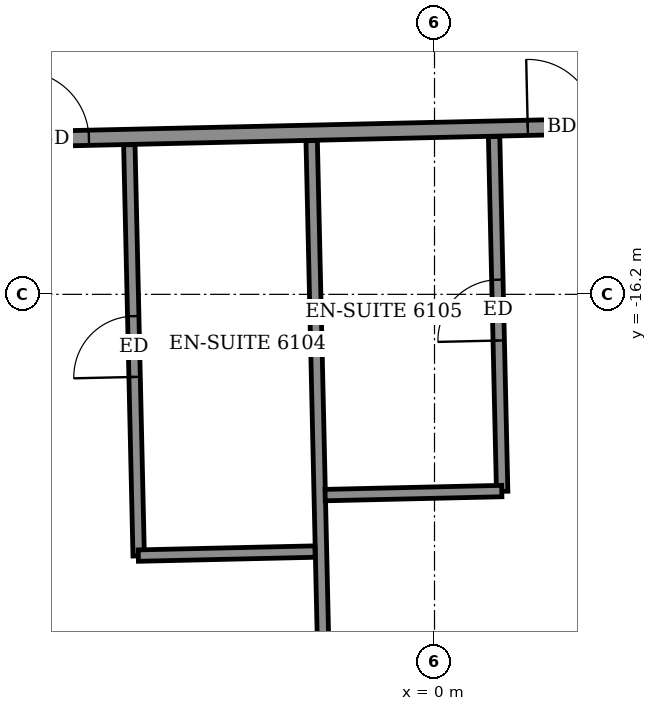
"""IFC4 building model, lengths in metres.
Left out: names, types, materials, properties, quantities, classifications, styles, units other than length and angle.
Written with IfcOpenShell. Run it as: python <this file> out.ifc"""

import sys

from ifc_helpers import new_model, si_unit, direction, frame, frame_2d, origin, place, context, subcontext, project, spatial, rectangle, extrude, element, fill, save


model = new_model("IFC4")
c1 = context("Model", 3, precision=1e-05, world=origin(), true_north=direction((0.0, 1.0)))
c2 = subcontext(c1, "Body", "Model", "MODEL_VIEW")
j1 = project(units=[si_unit("LENGTHUNIT", "METRE"), si_unit("PLANEANGLEUNIT", "RADIAN")], contexts=[c1])
p1 = place(None, origin())
s1 = spatial("IfcSite", under=j1, at=p1, CompositionType="ELEMENT")
p2 = place(p1, origin())
s2 = spatial("IfcBuilding", under=s1, at=p2, CompositionType="ELEMENT")
p3 = place(p2, frame((0.0, 0.0, 241.9)))
s3 = spatial("IfcBuildingStorey", under=s2, at=p3, CompositionType="ELEMENT", Elevation=241.9)
p4 = place(p3, frame((-1.358, -25.551, 0.0), z_axis=(0.0, 0.0, 1.0), x_axis=(-0.022684355347, 0.999742676904, 0.0)))
e1 = element("IfcWall", 1, at=p4, inside=s3, PredefinedType="PARTITIONING", context=c2, shape_type="SweptSolid", body=[
    extrude(rectangle(XDim=11.376, YDim=0.15, at=frame_2d((5.688, 0.0))), origin(), (0.0, 0.0, 1.0), 3.05),
])
p5 = place(p3, frame((-3.892, -19.641, 0.0), z_axis=(0.0, 0.0, 1.0), x_axis=(-0.022696805576, 0.999742394328, 0.0)))
e2 = element("IfcWall", 2, at=p5, inside=s3, PredefinedType="PARTITIONING", context=c2, shape_type="SweptSolid", body=[
    extrude(rectangle(XDim=5.411, YDim=0.15, at=frame_2d((2.705, 0.0))), origin(), (0.0, 0.0, 1.0), 3.05),
])
p6 = place(p5, frame((2.355, 0.0, 0.0)))
e3 = element("IfcOpeningElement", 3, at=p6, cuts=e2, PredefinedType="OPENING", context=c2, shape_type="SweptSolid", body=[
    extrude(rectangle(XDim=0.8, YDim=2.1, at=frame_2d((0.4, 1.05))), frame((0.0, 0.085, 0.0), z_axis=(0.0, -1.0, 0.0), x_axis=(1.0, 0.0, 0.0)), (0.0, 0.0, 1.0), 0.17),
])
p7 = place(p3, frame((-3.897, -19.637, 0.0), z_axis=(0.0, 0.0, 1.0), x_axis=(0.999740478815, 0.022781023197, 0.0)))
e4 = element("IfcWall", 4, at=p7, inside=s3, PredefinedType="PARTITIONING", context=c2, shape_type="SweptSolid", body=[
    extrude(rectangle(XDim=2.325, YDim=0.15, at=frame_2d((1.163, 0.0))), origin(), (0.0, 0.0, 1.0), 3.05),
])
p8 = place(p3, frame((0.89, -18.792, 0.0), z_axis=(0.0, 0.0, 1.0), x_axis=(-0.022688155425, 0.999742590672, 0.0)))
e5 = element("IfcWall", 5, at=p8, inside=s3, PredefinedType="PARTITIONING", context=c2, shape_type="SweptSolid", body=[
    extrude(rectangle(XDim=4.67, YDim=0.15, at=frame_2d((2.335, 0.0))), origin(), (0.0, 0.0, 1.0), 3.05),
])
p9 = place(p8, frame((1.985, 0.0, 0.0)))
e6 = element("IfcOpeningElement", 6, at=p9, cuts=e5, PredefinedType="OPENING", context=c2, shape_type="SweptSolid", body=[
    extrude(rectangle(XDim=0.8, YDim=2.1, at=frame_2d((0.4, 1.05))), frame((0.0, 0.085, 0.0), z_axis=(0.0, -1.0, 0.0), x_axis=(1.0, 0.0, 0.0)), (0.0, 0.0, 1.0), 0.17),
])
p10 = place(p3, frame((-1.439, -18.841, 0.0), z_axis=(0.0, 0.0, 1.0), x_axis=(0.999740260747, 0.02279059109, 0.0)))
e7 = element("IfcWall", 7, at=p10, inside=s3, PredefinedType="PARTITIONING", context=c2, shape_type="SweptSolid", body=[
    extrude(rectangle(XDim=2.324, YDim=0.15, at=frame_2d((1.162, 0.0))), origin(), (0.0, 0.0, 1.0), 3.05),
])
p11 = place(p3, frame((-27.016, -14.65, 0.0), z_axis=(0.0, 0.0, 1.0), x_axis=(0.999742874861, 0.022675629315, 0.0)))
e8 = element("IfcWall", 8, at=p11, inside=s3, PredefinedType="PARTITIONING", context=c2, shape_type="SweptSolid", body=[
    extrude(rectangle(XDim=50.883, YDim=0.2, at=frame_2d((25.442, 0.0))), origin(), (0.0, 0.0, 1.0), 3.05),
])
p12 = place(p11, frame((1.575, 0.0, 0.0)))
e9 = element("IfcOpeningElement", 9, at=p12, cuts=e8, PredefinedType="OPENING", context=c2, shape_type="SweptSolid", body=[
    extrude(rectangle(XDim=1.0, YDim=2.1, at=frame_2d((0.5, 1.05))), frame((0.0, 0.11, 0.0), z_axis=(0.0, -1.0, 0.0), x_axis=(1.0, 0.0, 0.0)), (0.0, 0.0, 1.0), 0.22),
])
p13 = place(p11, frame((6.4, 0.0, 0.0)))
e10 = element("IfcOpeningElement", 10, at=p13, cuts=e8, PredefinedType="OPENING", context=c2, shape_type="SweptSolid", body=[
    extrude(rectangle(XDim=0.9, YDim=2.1, at=frame_2d((0.45, 1.05))), frame((0.0, 0.11, 0.0), z_axis=(0.0, -1.0, 0.0), x_axis=(1.0, 0.0, 0.0)), (0.0, 0.0, 1.0), 0.22),
])
p14 = place(p11, frame((11.025, 0.0, 0.0)))
e11 = element("IfcOpeningElement", 11, at=p14, cuts=e8, PredefinedType="OPENING", context=c2, shape_type="SweptSolid", body=[
    extrude(rectangle(XDim=0.9, YDim=2.1, at=frame_2d((0.45, 1.05))), frame((0.0, 0.11, 0.0), z_axis=(0.0, -1.0, 0.0), x_axis=(1.0, 0.0, 0.0)), (0.0, 0.0, 1.0), 0.22),
])
p15 = place(p11, frame((12.925, 0.0, 0.0)))
e12 = element("IfcOpeningElement", 12, at=p15, cuts=e8, PredefinedType="OPENING", context=c2, shape_type="SweptSolid", body=[
    extrude(rectangle(XDim=0.9, YDim=2.1, at=frame_2d((0.45, 1.05))), frame((0.0, 0.11, 0.0), z_axis=(0.0, -1.0, 0.0), x_axis=(1.0, 0.0, 0.0)), (0.0, 0.0, 1.0), 0.22),
])
p16 = place(p11, frame((19.65, 0.0, 0.0)))
e13 = element("IfcOpeningElement", 13, at=p16, cuts=e8, PredefinedType="OPENING", context=c2, shape_type="SweptSolid", body=[
    extrude(rectangle(XDim=0.9, YDim=2.1, at=frame_2d((0.45, 1.05))), frame((0.0, 0.11, 0.0), z_axis=(0.0, -1.0, 0.0), x_axis=(1.0, 0.0, 0.0)), (0.0, 0.0, 1.0), 0.22),
])
p17 = place(p11, frame((21.575, 0.0, 0.0)))
e14 = element("IfcOpeningElement", 14, at=p17, cuts=e8, PredefinedType="OPENING", context=c2, shape_type="SweptSolid", body=[
    extrude(rectangle(XDim=0.9, YDim=2.1, at=frame_2d((0.45, 1.05))), frame((0.0, 0.11, 0.0), z_axis=(0.0, -1.0, 0.0), x_axis=(1.0, 0.0, 0.0)), (0.0, 0.0, 1.0), 0.22),
])
p18 = place(p11, frame((28.25, 0.0, 0.0)))
e15 = element("IfcOpeningElement", 15, at=p18, cuts=e8, PredefinedType="OPENING", context=c2, shape_type="SweptSolid", body=[
    extrude(rectangle(XDim=0.9, YDim=2.1, at=frame_2d((0.45, 1.05))), frame((0.0, 0.11, 0.0), z_axis=(0.0, -1.0, 0.0), x_axis=(1.0, 0.0, 0.0)), (0.0, 0.0, 1.0), 0.22),
])
p19 = place(p11, frame((30.125, 0.0, 0.0)))
e16 = element("IfcOpeningElement", 16, at=p19, cuts=e8, PredefinedType="OPENING", context=c2, shape_type="SweptSolid", body=[
    extrude(rectangle(XDim=0.9, YDim=2.1, at=frame_2d((0.45, 1.05))), frame((0.0, 0.11, 0.0), z_axis=(0.0, -1.0, 0.0), x_axis=(1.0, 0.0, 0.0)), (0.0, 0.0, 1.0), 0.22),
])
p20 = place(p11, frame((36.9, 0.0, 0.0)))
e17 = element("IfcOpeningElement", 17, at=p20, cuts=e8, PredefinedType="OPENING", context=c2, shape_type="SweptSolid", body=[
    extrude(rectangle(XDim=0.9, YDim=2.1, at=frame_2d((0.45, 1.05))), frame((0.0, 0.11, 0.0), z_axis=(0.0, -1.0, 0.0), x_axis=(1.0, 0.0, 0.0)), (0.0, 0.0, 1.0), 0.22),
])
p21 = place(p11, frame((38.85, 0.0, 0.0)))
e18 = element("IfcOpeningElement", 18, at=p21, cuts=e8, PredefinedType="OPENING", context=c2, shape_type="SweptSolid", body=[
    extrude(rectangle(XDim=0.9, YDim=2.1, at=frame_2d((0.45, 1.05))), frame((0.0, 0.11, 0.0), z_axis=(0.0, -1.0, 0.0), x_axis=(1.0, 0.0, 0.0)), (0.0, 0.0, 1.0), 0.22),
])
p22 = place(p11, frame((48.629, 0.0, 0.0)))
e19 = element("IfcOpeningElement", 19, at=p22, cuts=e8, PredefinedType="OPENING", context=c2, shape_type="SweptSolid", body=[
    extrude(rectangle(XDim=1.0, YDim=2.1, at=frame_2d((0.5, 1.05))), frame((0.0, 0.11, 0.0), z_axis=(0.0, -1.0, 0.0), x_axis=(1.0, 0.0, 0.0)), (0.0, 0.0, 1.0), 0.22),
])
p23 = place(p11, frame((43.6, 0.0, 0.0)))
e20 = element("IfcOpeningElement", 20, at=p23, cuts=e8, PredefinedType="OPENING", context=c2, shape_type="SweptSolid", body=[
    extrude(rectangle(XDim=0.9, YDim=2.1, at=frame_2d((0.45, 1.05))), frame((0.0, 0.11, 0.0), z_axis=(0.0, -1.0, 0.0), x_axis=(1.0, 0.0, 0.0)), (0.0, 0.0, 1.0), 0.22),
])
p24 = place(p17, origin())
e21 = element("IfcDoor", 21, at=p24, inside=s3, OperationType="SINGLE_SWING_RIGHT", PredefinedType="DOOR", context=c2, shape_type="SweptSolid", body=[
    extrude(rectangle(XDim=0.9, YDim=2.1, at=frame_2d((0.45, 1.05))), frame((0.0, 0.025, 0.0), z_axis=(0.0, -1.0, 0.0), x_axis=(1.0, 0.0, 0.0)), (0.0, 0.0, 1.0), 0.05),
])
fill(e14, e21)
p25 = place(p6, origin())
e22 = element("IfcDoor", 22, at=p25, inside=s3, OperationType="SINGLE_SWING_RIGHT", PredefinedType="DOOR", context=c2, shape_type="SweptSolid", body=[
    extrude(rectangle(XDim=0.8, YDim=2.1, at=frame_2d((0.4, 1.05))), frame((0.0, 0.025, 0.0), z_axis=(0.0, -1.0, 0.0), x_axis=(1.0, 0.0, 0.0)), (0.0, 0.0, 1.0), 0.05),
])
fill(e3, e22)
p26 = place(p18, origin())
e23 = element("IfcDoor", 23, at=p26, inside=s3, OperationType="SINGLE_SWING_LEFT", PredefinedType="DOOR", context=c2, shape_type="SweptSolid", body=[
    extrude(rectangle(XDim=0.9, YDim=2.1, at=frame_2d((0.45, 1.05))), frame((0.0, 0.025, 0.0), z_axis=(0.0, -1.0, 0.0), x_axis=(1.0, 0.0, 0.0)), (0.0, 0.0, 1.0), 0.05),
])
fill(e15, e23)
p27 = place(p9, origin())
e24 = element("IfcDoor", 24, at=p27, inside=s3, OperationType="SINGLE_SWING_LEFT", PredefinedType="DOOR", context=c2, shape_type="SweptSolid", body=[
    extrude(rectangle(XDim=0.8, YDim=2.1, at=frame_2d((0.4, 1.05))), frame((0.0, 0.025, 0.0), z_axis=(0.0, -1.0, 0.0), x_axis=(1.0, 0.0, 0.0)), (0.0, 0.0, 1.0), 0.05),
])
fill(e6, e24)
save(model, sys.argv[1])
